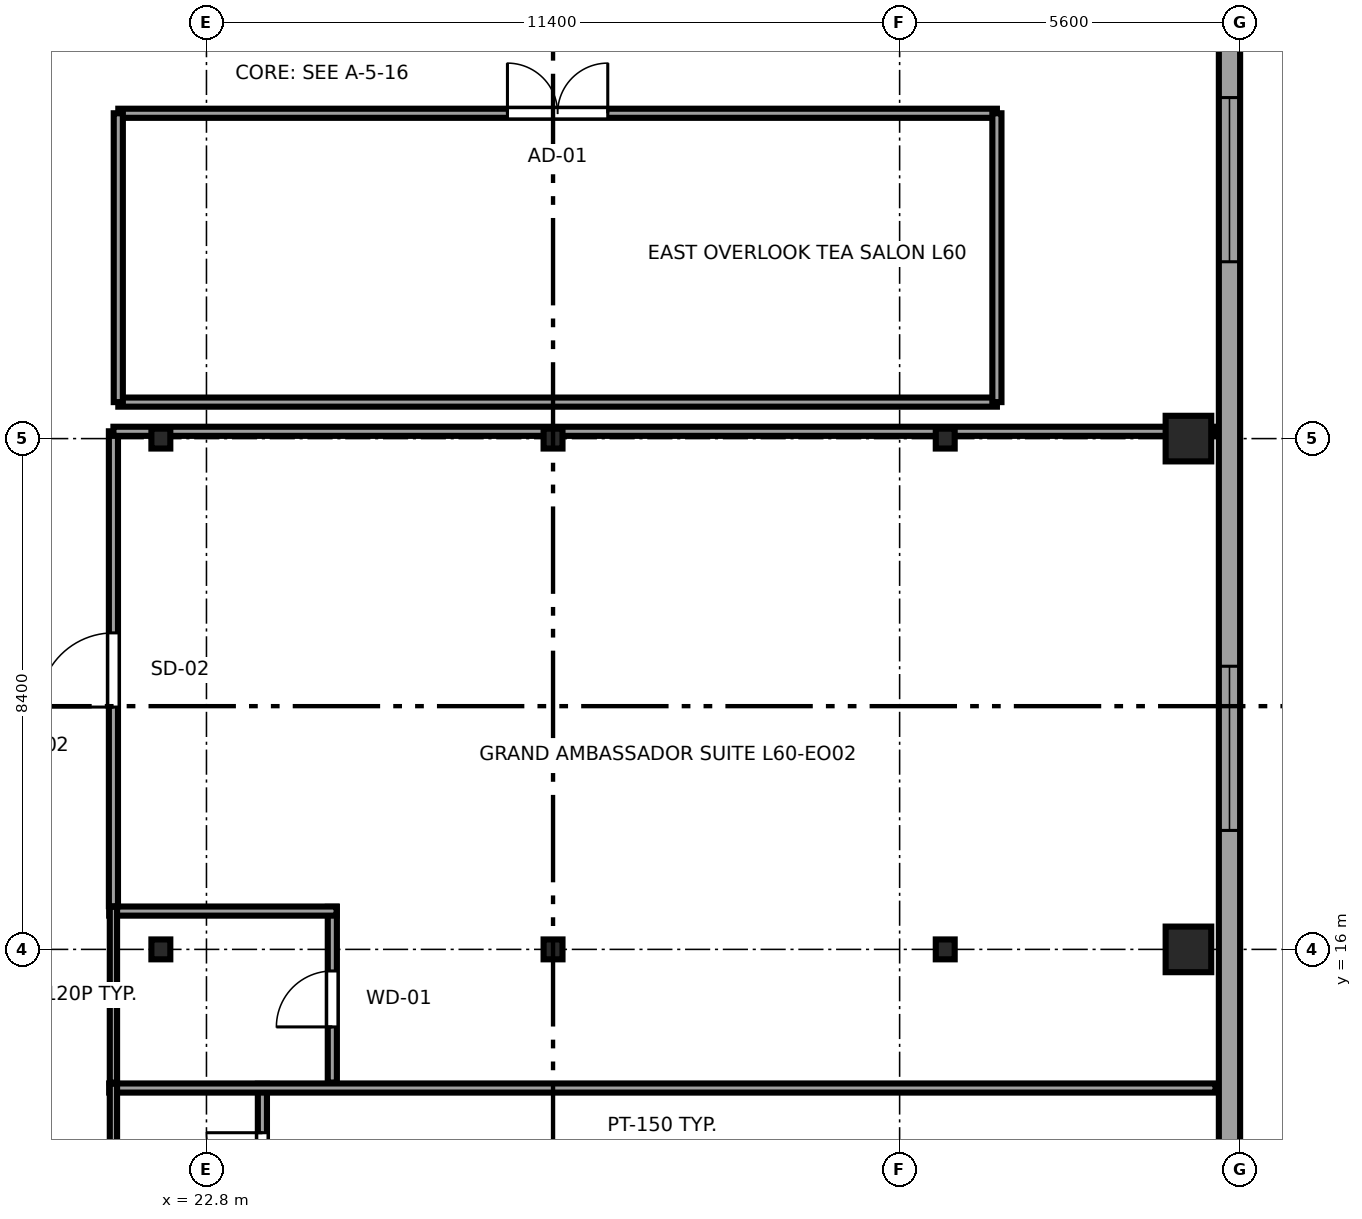
"""IFC4 building model, lengths in metres.
Left out: names, types, materials, properties, quantities, classifications, styles, units other than length and angle.
Written with IfcOpenShell. Run it as: python <this file> out.ifc"""

import sys

from ifc_helpers import new_model, si_unit, direction, frame, frame_2d, origin, origin_2d, place, context, subcontext, project, spatial, rectangle, i_section, extrude, source, transform, mapped, element, fill, save


model = new_model("IFC4")
c1 = context("Model", 3, precision=1e-05, world=origin(), true_north=direction((0.0, 1.0)))
c2 = subcontext(c1, "Body", "Model", "MODEL_VIEW")
j1 = project(units=[si_unit("LENGTHUNIT", "METRE"), si_unit("PLANEANGLEUNIT", "RADIAN")], contexts=[c1])
p1 = place(None, origin())
s1 = spatial("IfcSite", under=j1, at=p1, CompositionType="ELEMENT")
p2 = place(p1, origin())
s2 = spatial("IfcBuilding", under=s1, at=p2, CompositionType="ELEMENT")
p3 = place(p2, frame((0.0, 0.0, 227.45)))
s3 = spatial("IfcBuildingStorey", under=s2, at=p3, CompositionType="ELEMENT", Elevation=227.45)
m1 = source(origin(), c2, "Body", "SweptSolid", [
    extrude(i_section(OverallWidth=0.311, OverallDepth=0.327, WebThickness=0.016, FlangeThickness=0.025, FilletRadius=0.017, at=origin_2d()), origin(), (0.0, 0.0, 1.0), 3.55),
])
for number, where, z_axis, x_axis in (
    (1, (22.05, 16.0, 0.0), (0.0, 0.0, 1.0), (1.0, 0.0, 0.0)),
    (2, (22.05, 24.4, 0.0), (0.0, 0.0, 1.0), (1.0, 0.0, 0.0)),
    (3, (28.5, 16.0, 0.0), (0.0, 0.0, 1.0), (1.0, 0.0, 0.0)),
    (4, (28.5, 24.4, 0.0), (0.0, 0.0, 1.0), (1.0, 0.0, 0.0)),
    (5, (34.95, 16.0, 0.0), (0.0, 0.0, 1.0), (1.0, 0.0, 0.0)),
    (6, (34.95, 24.4, 0.0), (0.0, 0.0, 1.0), (1.0, 0.0, 0.0)),
):
    element("IfcColumn", number, at=place(p3, frame(where, z_axis=z_axis, x_axis=x_axis)), inside=s3, PredefinedType="COLUMN", context=c2, shape_type="MappedRepresentation", body=[
        mapped(m1, transform((0.0, 0.0, 0.0), x_axis=(1.0, 0.0, 0.0), y_axis=(0.0, 1.0, 0.0), z_axis=(0.0, 0.0, 1.0), scale=1.0)),
    ])
m2 = source(origin(), c2, "Body", "SweptSolid", [
    extrude(rectangle(XDim=0.75, YDim=0.75, at=origin_2d()), origin(), (0.0, 0.0, 1.0), 3.55),
])
for number, where, z_axis, x_axis in (
    (7, (38.95, 16.0, 0.0), (0.0, 0.0, 1.0), (1.0, 0.0, 0.0)),
    (8, (38.95, 24.4, 0.0), (0.0, 0.0, 1.0), (1.0, 0.0, 0.0)),
):
    element("IfcColumn", number, at=place(p3, frame(where, z_axis=z_axis, x_axis=x_axis)), inside=s3, PredefinedType="COLUMN", context=c2, shape_type="MappedRepresentation", body=[
        mapped(m2, transform((0.0, 0.0, 0.0), x_axis=(1.0, 0.0, 0.0), y_axis=(0.0, 1.0, 0.0), z_axis=(0.0, 0.0, 1.0), scale=1.0)),
    ])
p4 = place(p3, frame((39.625, 7.017, 0.0), z_axis=(0.0, 0.0, 1.0), x_axis=(0.0, 1.0, 0.0)))
e9 = element("IfcWall", 9, at=p4, inside=s3, PredefinedType="SOLIDWALL", context=c2, shape_type="SweptSolid", body=[
    extrude(rectangle(XDim=24.579, YDim=0.35, at=frame_2d((12.29, 0.0))), origin(), (0.0, 0.0, 1.0), 3.37),
])
p5 = place(p4, frame((2.138, 0.0, 0.68)))
e10 = element("IfcOpeningElement", 10, at=p5, cuts=e9, PredefinedType="OPENING", context=c2, shape_type="SweptSolid", body=[
    extrude(rectangle(XDim=2.7, YDim=1.95, at=frame_2d((1.35, 0.975))), frame((0.0, 0.185, 0.0), z_axis=(0.0, -1.0, 0.0), x_axis=(1.0, 0.0, 0.0)), (0.0, 0.0, 1.0), 0.37),
])
p6 = place(p4, frame((10.939, 0.0, 0.68)))
e11 = element("IfcOpeningElement", 11, at=p6, cuts=e9, PredefinedType="OPENING", context=c2, shape_type="SweptSolid", body=[
    extrude(rectangle(XDim=2.7, YDim=1.95, at=frame_2d((1.35, 0.975))), frame((0.0, 0.185, 0.0), z_axis=(0.0, -1.0, 0.0), x_axis=(1.0, 0.0, 0.0)), (0.0, 0.0, 1.0), 0.37),
])
p7 = place(p4, frame((20.291, 0.0, 0.68)))
e12 = element("IfcOpeningElement", 12, at=p7, cuts=e9, PredefinedType="OPENING", context=c2, shape_type="SweptSolid", body=[
    extrude(rectangle(XDim=2.7, YDim=1.95, at=frame_2d((1.35, 0.975))), frame((0.0, 0.185, 0.0), z_axis=(0.0, -1.0, 0.0), x_axis=(1.0, 0.0, 0.0)), (0.0, 0.0, 1.0), 0.37),
])
p8 = place(p3, frame((23.72, 11.4, 0.0), z_axis=(0.0, 0.0, 1.0), x_axis=(0.0, 1.0, 0.0)))
e13 = element("IfcWall", 13, at=p8, inside=s3, PredefinedType="PARTITIONING", context=c2, shape_type="SweptSolid", body=[
    extrude(rectangle(XDim=2.39, YDim=0.15, at=frame_2d((1.195, 0.0))), origin(), (0.0, 0.0, 1.0), 3.37),
])
p9 = place(p8, frame((0.665, 0.0, 0.0)))
e14 = element("IfcOpeningElement", 14, at=p9, cuts=e13, PredefinedType="OPENING", context=c2, shape_type="SweptSolid", body=[
    extrude(rectangle(XDim=0.92, YDim=2.01, at=frame_2d((0.46, 1.005))), frame((0.0, 0.085, 0.0), z_axis=(0.0, -1.0, 0.0), x_axis=(1.0, 0.0, 0.0)), (0.0, 0.0, 1.0), 0.17),
])
p10 = place(p3, frame((21.2, 13.72, 0.0), z_axis=(0.0, 0.0, 1.0), x_axis=(1.0, 0.0, 0.0)))
e15 = element("IfcWall", 15, at=p10, inside=s3, PredefinedType="PARTITIONING", context=c2, shape_type="SweptSolid", body=[
    extrude(rectangle(XDim=18.195, YDim=0.15, at=frame_2d((9.098, 0.0))), origin(), (0.0, 0.0, 1.0), 3.37),
])
p11 = place(p3, frame((21.27, 11.4, 0.0), z_axis=(0.0, 0.0, 1.0), x_axis=(0.0, 1.0, 0.0)))
e16 = element("IfcWall", 16, at=p11, inside=s3, PredefinedType="PLUMBINGWALL", context=c2, shape_type="SweptSolid", body=[
    extrude(rectangle(XDim=2.39, YDim=0.12, at=frame_2d((1.195, 0.0))), origin(), (0.0, 0.0, 1.0), 3.37),
])
p12 = place(p3, frame((24.87, 13.81, 0.0), z_axis=(0.0, 0.0, 1.0), x_axis=(0.0, 1.0, 0.0)))
e17 = element("IfcWall", 17, at=p12, inside=s3, PredefinedType="PARTITIONING", context=c2, shape_type="SweptSolid", body=[
    extrude(rectangle(XDim=2.89, YDim=0.15, at=frame_2d((1.445, 0.0))), origin(), (0.0, 0.0, 1.0), 3.37),
])
p13 = place(p12, frame((0.915, 0.0, 0.0)))
e18 = element("IfcOpeningElement", 18, at=p13, cuts=e17, PredefinedType="OPENING", context=c2, shape_type="SweptSolid", body=[
    extrude(rectangle(XDim=0.92, YDim=2.01, at=frame_2d((0.46, 1.005))), frame((0.0, 0.085, 0.0), z_axis=(0.0, -1.0, 0.0), x_axis=(1.0, 0.0, 0.0)), (0.0, 0.0, 1.0), 0.17),
])
p14 = place(p3, frame((21.2, 16.63, 0.0), z_axis=(0.0, 0.0, 1.0), x_axis=(1.0, 0.0, 0.0)))
e19 = element("IfcWall", 19, at=p14, inside=s3, PredefinedType="PARTITIONING", context=c2, shape_type="SweptSolid", body=[
    extrude(rectangle(XDim=3.74, YDim=0.15, at=frame_2d((1.87, 0.0))), origin(), (0.0, 0.0, 1.0), 3.37),
])
p15 = place(p3, frame((21.27, 13.81, 0.0), z_axis=(0.0, 0.0, 1.0), x_axis=(0.0, 1.0, 0.0)))
e20 = element("IfcWall", 20, at=p15, inside=s3, PredefinedType="PLUMBINGWALL", context=c2, shape_type="SweptSolid", body=[
    extrude(rectangle(XDim=2.89, YDim=0.12, at=frame_2d((1.445, 0.0))), origin(), (0.0, 0.0, 1.0), 3.37),
])
p16 = place(p3, frame((21.27, 16.71, 0.0), z_axis=(0.0, 0.0, 1.0), x_axis=(0.0, 1.0, 0.0)))
e21 = element("IfcWall", 21, at=p16, inside=s3, PredefinedType="PARTITIONING", context=c2, shape_type="SweptSolid", body=[
    extrude(rectangle(XDim=7.81, YDim=0.15, at=frame_2d((3.905, 0.0))), origin(), (0.0, 0.0, 1.0), 3.37),
])
p17 = place(p16, frame((3.275, 0.0, 0.0)))
e22 = element("IfcOpeningElement", 22, at=p17, cuts=e21, PredefinedType="OPENING", context=c2, shape_type="SweptSolid", body=[
    extrude(rectangle(XDim=1.22, YDim=2.08, at=frame_2d((0.61, 1.04))), frame((0.0, 0.085, 0.0), z_axis=(0.0, -1.0, 0.0), x_axis=(1.0, 0.0, 0.0)), (0.0, 0.0, 1.0), 0.17),
])
p18 = place(p3, frame((21.27, 24.52, 0.0), z_axis=(0.0, 0.0, 1.0), x_axis=(1.0, 0.0, 0.0)))
e23 = element("IfcWall", 23, at=p18, inside=s3, PredefinedType="PARTITIONING", context=c2, shape_type="SweptSolid", body=[
    extrude(rectangle(XDim=18.125, YDim=0.15, at=frame_2d((9.062, 0.0))), origin(), (0.0, 0.0, 1.0), 2.758),
])
p19 = place(p3, frame((21.35, 25.0, 0.0), z_axis=(0.0, 0.0, 1.0), x_axis=(1.0, 0.0, 0.0)))
e24 = element("IfcWall", 24, at=p19, inside=s3, PredefinedType="PARTITIONING", context=c2, shape_type="SweptSolid", body=[
    extrude(rectangle(XDim=14.45, YDim=0.15, at=frame_2d((7.225, 0.0))), origin(), (0.0, 0.0, 1.0), 3.37),
])
p20 = place(p3, frame((21.35, 29.75, 0.0), z_axis=(0.0, 0.0, 1.0), x_axis=(1.0, 0.0, 0.0)))
e25 = element("IfcWall", 25, at=p20, inside=s3, PredefinedType="PARTITIONING", context=c2, shape_type="SweptSolid", body=[
    extrude(rectangle(XDim=14.45, YDim=0.15, at=frame_2d((7.225, 0.0))), origin(), (0.0, 0.0, 1.0), 3.37),
])
p21 = place(p20, frame((6.4, 0.0, 0.0)))
e26 = element("IfcOpeningElement", 26, at=p21, cuts=e25, PredefinedType="OPENING", context=c2, shape_type="SweptSolid", body=[
    extrude(rectangle(XDim=1.65, YDim=2.15, at=frame_2d((0.825, 1.075))), frame((0.0, 0.085, 0.0), z_axis=(0.0, -1.0, 0.0), x_axis=(1.0, 0.0, 0.0)), (0.0, 0.0, 1.0), 0.17),
])
for number, where, z_axis, x_axis in (
    (27, (21.35, 25.0, 0.0), (0.0, 0.0, 1.0), (0.0, 1.0, 0.0)),
    (28, (35.8, 25.0, 0.0), (0.0, 0.0, 1.0), (0.0, 1.0, 0.0)),
):
    element("IfcWall", number, at=place(p3, frame(where, z_axis=z_axis, x_axis=x_axis)), inside=s3, PredefinedType="PARTITIONING", context=c2, shape_type="SweptSolid", body=[
        extrude(rectangle(XDim=4.75, YDim=0.15, at=frame_2d((2.375, 0.0))), origin(), (0.0, 0.0, 1.0), 3.37),
    ])
m3 = source(origin(), c2, "Body", "SweptSolid", [
    extrude(rectangle(XDim=2.7, YDim=1.95, at=frame_2d((1.35, 0.975))), frame((0.0, 0.09, 0.0), z_axis=(0.0, -1.0, 0.0), x_axis=(1.0, 0.0, 0.0)), (0.0, 0.0, 1.0), 0.06),
])
p22 = place(p6, origin())
e29 = element("IfcWindow", 29, at=p22, inside=s3, PartitioningType="TRIPLE_PANEL_HORIZONTAL", PredefinedType="WINDOW", context=c2, shape_type="MappedRepresentation", body=[
    mapped(m3, transform((0.0, 0.0, 0.0), x_axis=(1.0, 0.0, 0.0), y_axis=(0.0, 1.0, 0.0), z_axis=(0.0, 0.0, 1.0), scale=1.0)),
])
fill(e11, e29)
p23 = place(p7, origin())
e30 = element("IfcWindow", 30, at=p23, inside=s3, PartitioningType="TRIPLE_PANEL_HORIZONTAL", PredefinedType="WINDOW", context=c2, shape_type="MappedRepresentation", body=[
    mapped(m3, transform((0.0, 0.0, 0.0), x_axis=(1.0, 0.0, 0.0), y_axis=(0.0, 1.0, 0.0), z_axis=(0.0, 0.0, 1.0), scale=1.0)),
])
fill(e12, e30)
m4 = source(origin(), c2, "Body", "SweptSolid", [
    extrude(rectangle(XDim=0.92, YDim=2.01, at=frame_2d((0.46, 1.005))), frame((0.0, 0.025, 0.0), z_axis=(0.0, -1.0, 0.0), x_axis=(1.0, 0.0, 0.0)), (0.0, 0.0, 1.0), 0.05),
])
p24 = place(p9, origin())
e31 = element("IfcDoor", 31, at=p24, inside=s3, OperationType="SINGLE_SWING_RIGHT", PredefinedType="DOOR", context=c2, shape_type="MappedRepresentation", body=[
    mapped(m4, transform((0.0, 0.0, 0.0), x_axis=(1.0, 0.0, 0.0), y_axis=(0.0, 1.0, 0.0), z_axis=(0.0, 0.0, 1.0), scale=1.0)),
])
fill(e14, e31)
p25 = place(p13, origin())
e32 = element("IfcDoor", 32, at=p25, inside=s3, OperationType="SINGLE_SWING_LEFT", PredefinedType="DOOR", context=c2, shape_type="MappedRepresentation", body=[
    mapped(m4, transform((0.0, 0.0, 0.0), x_axis=(1.0, 0.0, 0.0), y_axis=(0.0, 1.0, 0.0), z_axis=(0.0, 0.0, 1.0), scale=1.0)),
])
fill(e18, e32)
m5 = source(origin(), c2, "Body", "SweptSolid", [
    extrude(rectangle(XDim=1.22, YDim=2.08, at=frame_2d((0.61, 1.04))), frame((0.0, 0.025, 0.0), z_axis=(0.0, -1.0, 0.0), x_axis=(1.0, 0.0, 0.0)), (0.0, 0.0, 1.0), 0.05),
])
p26 = place(p17, origin())
e33 = element("IfcDoor", 33, at=p26, inside=s3, OperationType="SINGLE_SWING_LEFT", PredefinedType="DOOR", context=c2, shape_type="MappedRepresentation", body=[
    mapped(m5, transform((0.0, 0.0, 0.0), x_axis=(1.0, 0.0, 0.0), y_axis=(0.0, 1.0, 0.0), z_axis=(0.0, 0.0, 1.0), scale=1.0)),
])
fill(e22, e33)
m6 = source(origin(), c2, "Body", "SweptSolid", [
    extrude(rectangle(XDim=1.65, YDim=2.15, at=frame_2d((0.825, 1.075))), frame((0.0, 0.025, 0.0), z_axis=(0.0, -1.0, 0.0), x_axis=(1.0, 0.0, 0.0)), (0.0, 0.0, 1.0), 0.05),
])
p27 = place(p21, origin())
e34 = element("IfcDoor", 34, at=p27, inside=s3, OperationType="DOUBLE_DOOR_SINGLE_SWING", PredefinedType="DOOR", context=c2, shape_type="MappedRepresentation", body=[
    mapped(m6, transform((0.0, 0.0, 0.0), x_axis=(1.0, 0.0, 0.0), y_axis=(0.0, 1.0, 0.0), z_axis=(0.0, 0.0, 1.0), scale=1.0)),
])
fill(e26, e34)
save(model, sys.argv[1])
